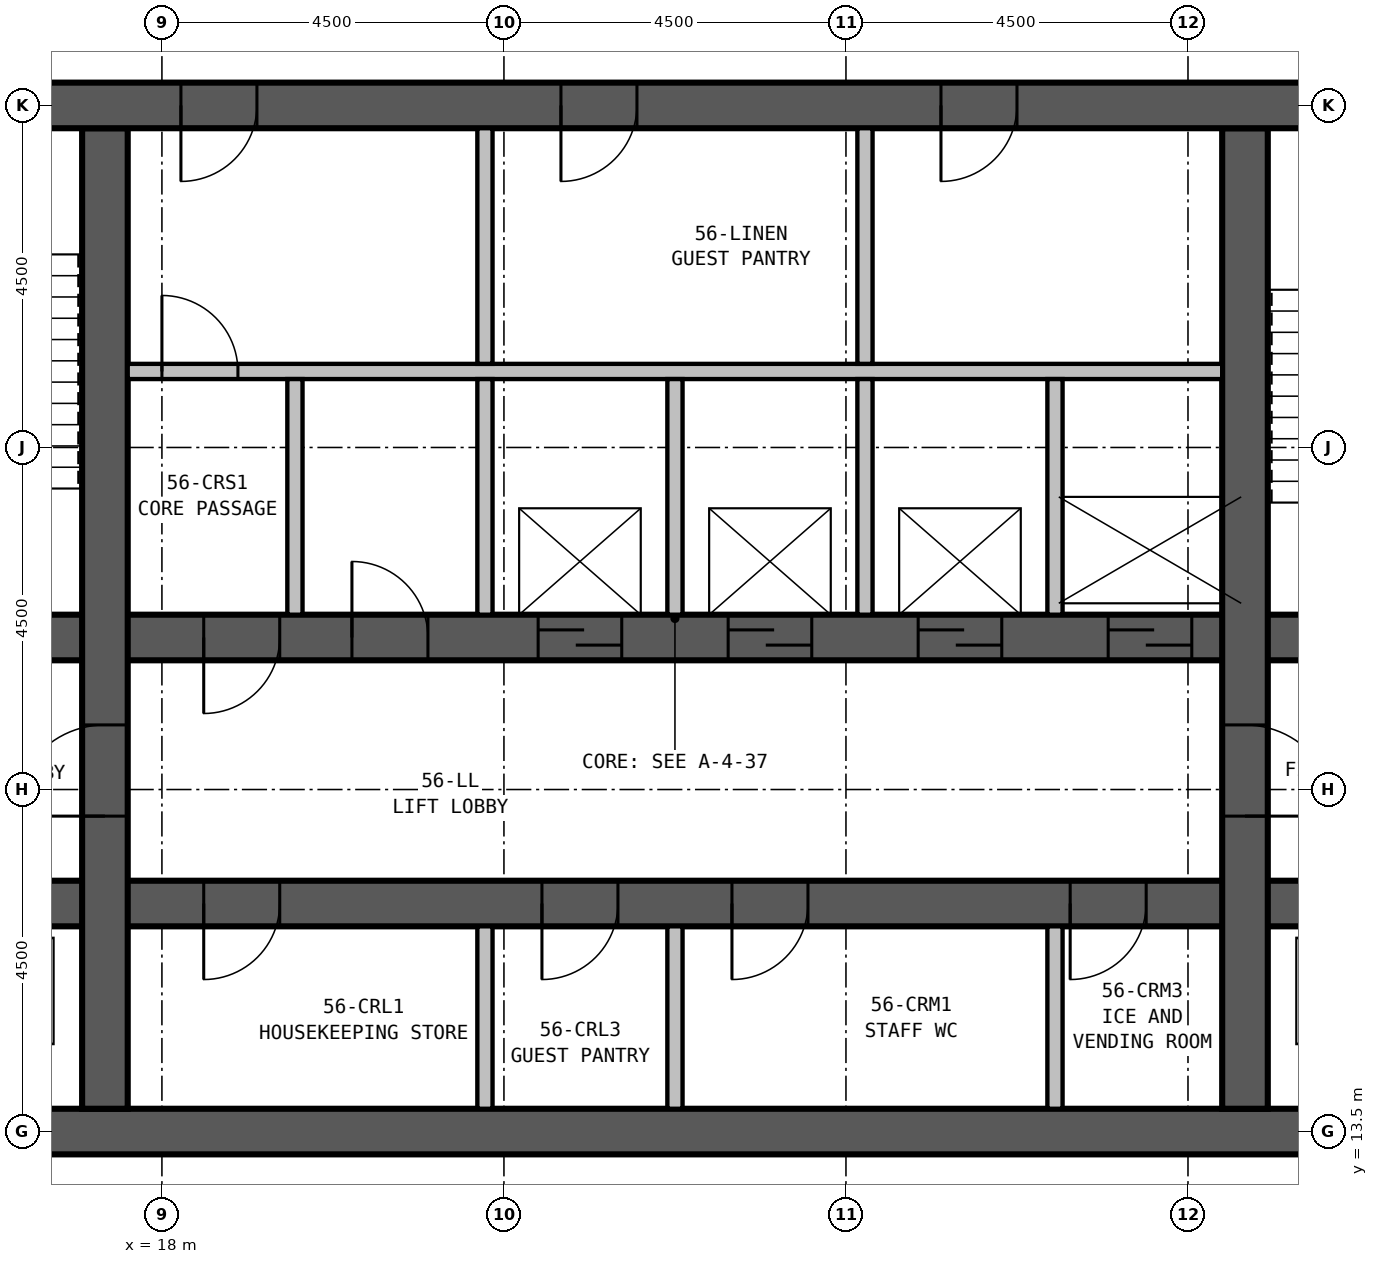
"""IFC4 building model, lengths in metres.
Left out: names, types, materials, properties, quantities, classifications, styles, units other than length and angle.
Written with IfcOpenShell. Run it as: python <this file> out.ifc"""

import sys

from ifc_helpers import new_model, si_unit, direction, frame, frame_2d, origin, place, context, subcontext, project, spatial, rectangle, extrude, element, fill, save


model = new_model("IFC4")
c1 = context("Model", 3, precision=1e-05, world=origin(), true_north=direction((0.0, 1.0)))
c2 = subcontext(c1, "Body", "Model", "MODEL_VIEW")
j1 = project(units=[si_unit("LENGTHUNIT", "METRE"), si_unit("PLANEANGLEUNIT", "RADIAN")], contexts=[c1])
p1 = place(None, origin())
s1 = spatial("IfcSite", under=j1, at=p1, CompositionType="ELEMENT")
p2 = place(p1, origin())
s2 = spatial("IfcBuilding", under=s1, at=p2, CompositionType="ELEMENT")
p3 = place(p2, frame((0.0, 0.0, 217.4)))
s3 = spatial("IfcBuildingStorey", under=s2, at=p3, CompositionType="ELEMENT", Elevation=217.4)
p4 = place(p3, frame((13.2, 13.5, 0.0), z_axis=(0.0, 0.0, 1.0), x_axis=(1.0, 0.0, 0.0)))
e1 = element("IfcWall", 1, at=p4, inside=s3, PredefinedType="SHEAR", context=c2, shape_type="SweptSolid", body=[
    extrude(rectangle(XDim=23.1, YDim=0.6, at=frame_2d((11.55, 0.0))), origin(), (0.0, 0.0, 1.0), 3.9),
])
p5 = place(p3, frame((36.3, 27.0, 0.0), z_axis=(0.0, 0.0, 1.0), x_axis=(-1.0, 0.0, 0.0)))
e2 = element("IfcWall", 2, at=p5, inside=s3, PredefinedType="SHEAR", context=c2, shape_type="SweptSolid", body=[
    extrude(rectangle(XDim=23.35, YDim=0.6, at=frame_2d((11.675, 0.0))), origin(), (0.0, 0.0, 1.0), 3.9),
])
p6 = place(p5, frame((17.05, 0.0, 0.0)))
e3 = element("IfcOpeningElement", 3, at=p6, cuts=e2, PredefinedType="OPENING", context=c2, shape_type="SweptSolid", body=[
    extrude(rectangle(XDim=1.0, YDim=2.1, at=frame_2d((0.5, 1.05))), frame((0.0, 0.31, 0.0), z_axis=(0.0, -1.0, 0.0), x_axis=(1.0, 0.0, 0.0)), (0.0, 0.0, 1.0), 0.62),
])
p7 = place(p5, frame((12.05, 0.0, 0.0)))
e4 = element("IfcOpeningElement", 4, at=p7, cuts=e2, PredefinedType="OPENING", context=c2, shape_type="SweptSolid", body=[
    extrude(rectangle(XDim=1.0, YDim=2.1, at=frame_2d((0.5, 1.05))), frame((0.0, 0.31, 0.0), z_axis=(0.0, -1.0, 0.0), x_axis=(1.0, 0.0, 0.0)), (0.0, 0.0, 1.0), 0.62),
])
p8 = place(p5, frame((7.05, 0.0, 0.0)))
e5 = element("IfcOpeningElement", 5, at=p8, cuts=e2, PredefinedType="OPENING", context=c2, shape_type="SweptSolid", body=[
    extrude(rectangle(XDim=1.0, YDim=2.1, at=frame_2d((0.5, 1.05))), frame((0.0, 0.31, 0.0), z_axis=(0.0, -1.0, 0.0), x_axis=(1.0, 0.0, 0.0)), (0.0, 0.0, 1.0), 0.62),
])
p9 = place(p3, frame((17.25, 13.8, 0.0), z_axis=(0.0, 0.0, 1.0), x_axis=(0.0, 1.0, 0.0)))
e6 = element("IfcWall", 6, at=p9, inside=s3, PredefinedType="SHEAR", context=c2, shape_type="SweptSolid", body=[
    extrude(rectangle(XDim=12.9, YDim=0.6, at=frame_2d((6.45, 0.0))), origin(), (0.0, 0.0, 1.0), 3.9),
])
p10 = place(p9, frame((3.85, 0.0, 0.0)))
e7 = element("IfcOpeningElement", 7, at=p10, cuts=e6, PredefinedType="OPENING", context=c2, shape_type="SweptSolid", body=[
    extrude(rectangle(XDim=1.2, YDim=2.1, at=frame_2d((0.6, 1.05))), frame((0.0, 0.31, 0.0), z_axis=(0.0, -1.0, 0.0), x_axis=(1.0, 0.0, 0.0)), (0.0, 0.0, 1.0), 0.62),
])
p11 = place(p3, frame((32.25, 13.8, 0.0), z_axis=(0.0, 0.0, 1.0), x_axis=(0.0, 1.0, 0.0)))
e8 = element("IfcWall", 8, at=p11, inside=s3, PredefinedType="SHEAR", context=c2, shape_type="SweptSolid", body=[
    extrude(rectangle(XDim=12.9, YDim=0.6, at=frame_2d((6.45, 0.0))), origin(), (0.0, 0.0, 1.0), 3.9),
])
p12 = place(p11, frame((5.05, 0.0, 0.0), z_axis=(0.0, 0.0, 1.0), x_axis=(-1.0, 0.0, 0.0)))
e9 = element("IfcOpeningElement", 9, at=p12, cuts=e8, PredefinedType="OPENING", context=c2, shape_type="SweptSolid", body=[
    extrude(rectangle(XDim=1.2, YDim=2.1, at=frame_2d((0.6, 1.05))), frame((0.0, 0.31, 0.0), z_axis=(0.0, -1.0, 0.0), x_axis=(1.0, 0.0, 0.0)), (0.0, 0.0, 1.0), 0.62),
])
p13 = place(p3, frame((13.8, 16.5, 0.0), z_axis=(0.0, 0.0, 1.0), x_axis=(1.0, 0.0, 0.0)))
e10 = element("IfcWall", 10, at=p13, inside=s3, PredefinedType="SHEAR", context=c2, shape_type="SweptSolid", body=[
    extrude(rectangle(XDim=21.9, YDim=0.6, at=frame_2d((10.95, 0.0))), origin(), (0.0, 0.0, 1.0), 3.9),
])
p14 = place(p13, frame((5.75, 0.0, 0.0), z_axis=(0.0, 0.0, 1.0), x_axis=(-1.0, 0.0, 0.0)))
e11 = element("IfcOpeningElement", 11, at=p14, cuts=e10, PredefinedType="OPENING", context=c2, shape_type="SweptSolid", body=[
    extrude(rectangle(XDim=1.0, YDim=2.1, at=frame_2d((0.5, 1.05))), frame((0.0, 0.31, 0.0), z_axis=(0.0, -1.0, 0.0), x_axis=(1.0, 0.0, 0.0)), (0.0, 0.0, 1.0), 0.62),
])
p15 = place(p13, frame((10.2, 0.0, 0.0), z_axis=(0.0, 0.0, 1.0), x_axis=(-1.0, 0.0, 0.0)))
e12 = element("IfcOpeningElement", 12, at=p15, cuts=e10, PredefinedType="OPENING", context=c2, shape_type="SweptSolid", body=[
    extrude(rectangle(XDim=1.0, YDim=2.1, at=frame_2d((0.5, 1.05))), frame((0.0, 0.31, 0.0), z_axis=(0.0, -1.0, 0.0), x_axis=(1.0, 0.0, 0.0)), (0.0, 0.0, 1.0), 0.62),
])
p16 = place(p13, frame((12.7, 0.0, 0.0), z_axis=(0.0, 0.0, 1.0), x_axis=(-1.0, 0.0, 0.0)))
e13 = element("IfcOpeningElement", 13, at=p16, cuts=e10, PredefinedType="OPENING", context=c2, shape_type="SweptSolid", body=[
    extrude(rectangle(XDim=1.0, YDim=2.1, at=frame_2d((0.5, 1.05))), frame((0.0, 0.31, 0.0), z_axis=(0.0, -1.0, 0.0), x_axis=(1.0, 0.0, 0.0)), (0.0, 0.0, 1.0), 0.62),
])
p17 = place(p13, frame((17.15, 0.0, 0.0), z_axis=(0.0, 0.0, 1.0), x_axis=(-1.0, 0.0, 0.0)))
e14 = element("IfcOpeningElement", 14, at=p17, cuts=e10, PredefinedType="OPENING", context=c2, shape_type="SweptSolid", body=[
    extrude(rectangle(XDim=1.0, YDim=2.1, at=frame_2d((0.5, 1.05))), frame((0.0, 0.31, 0.0), z_axis=(0.0, -1.0, 0.0), x_axis=(1.0, 0.0, 0.0)), (0.0, 0.0, 1.0), 0.62),
])
p18 = place(p13, frame((0.6, 0.0, 0.0)))
e15 = element("IfcOpeningElement", 15, at=p18, cuts=e10, PredefinedType="OPENING", context=c2, shape_type="SweptSolid", body=[
    extrude(rectangle(XDim=1.2, YDim=2.1, at=frame_2d((0.6, 1.05))), frame((0.0, 0.31, 0.0), z_axis=(0.0, -1.0, 0.0), x_axis=(1.0, 0.0, 0.0)), (0.0, 0.0, 1.0), 0.62),
])
p19 = place(p13, frame((19.6, 0.0, 0.0)))
e16 = element("IfcOpeningElement", 16, at=p19, cuts=e10, PredefinedType="OPENING", context=c2, shape_type="SweptSolid", body=[
    extrude(rectangle(XDim=1.2, YDim=2.1, at=frame_2d((0.6, 1.05))), frame((0.0, 0.31, 0.0), z_axis=(0.0, -1.0, 0.0), x_axis=(1.0, 0.0, 0.0)), (0.0, 0.0, 1.0), 0.62),
])
p20 = place(p3, frame((13.8, 20.0, 0.0), z_axis=(0.0, 0.0, 1.0), x_axis=(1.0, 0.0, 0.0)))
e17 = element("IfcWall", 17, at=p20, inside=s3, PredefinedType="SHEAR", context=c2, shape_type="SweptSolid", body=[
    extrude(rectangle(XDim=21.9, YDim=0.6, at=frame_2d((10.95, 0.0))), origin(), (0.0, 0.0, 1.0), 3.9),
])
p21 = place(p20, frame((0.5, 0.0, 0.0)))
e18 = element("IfcOpeningElement", 18, at=p21, cuts=e17, PredefinedType="OPENING", context=c2, shape_type="SweptSolid", body=[
    extrude(rectangle(XDim=1.0, YDim=2.1, at=frame_2d((0.5, 1.05))), frame((0.0, 0.31, 0.0), z_axis=(0.0, -1.0, 0.0), x_axis=(1.0, 0.0, 0.0)), (0.0, 0.0, 1.0), 0.62),
])
p22 = place(p20, frame((20.5, 0.0, 0.0)))
e19 = element("IfcOpeningElement", 19, at=p22, cuts=e17, PredefinedType="OPENING", context=c2, shape_type="SweptSolid", body=[
    extrude(rectangle(XDim=1.0, YDim=2.1, at=frame_2d((0.5, 1.05))), frame((0.0, 0.31, 0.0), z_axis=(0.0, -1.0, 0.0), x_axis=(1.0, 0.0, 0.0)), (0.0, 0.0, 1.0), 0.62),
])
p23 = place(p20, frame((9.15, 0.0, 0.0)))
e20 = element("IfcOpeningElement", 20, at=p23, cuts=e17, PredefinedType="OPENING", context=c2, shape_type="SweptSolid", body=[
    extrude(rectangle(XDim=1.1, YDim=2.1, at=frame_2d((0.55, 1.05))), frame((0.0, 0.31, 0.0), z_axis=(0.0, -1.0, 0.0), x_axis=(1.0, 0.0, 0.0)), (0.0, 0.0, 1.0), 0.62),
])
p24 = place(p20, frame((11.65, 0.0, 0.0)))
e21 = element("IfcOpeningElement", 21, at=p24, cuts=e17, PredefinedType="OPENING", context=c2, shape_type="SweptSolid", body=[
    extrude(rectangle(XDim=1.1, YDim=2.1, at=frame_2d((0.55, 1.05))), frame((0.0, 0.31, 0.0), z_axis=(0.0, -1.0, 0.0), x_axis=(1.0, 0.0, 0.0)), (0.0, 0.0, 1.0), 0.62),
])
p25 = place(p20, frame((14.15, 0.0, 0.0)))
e22 = element("IfcOpeningElement", 22, at=p25, cuts=e17, PredefinedType="OPENING", context=c2, shape_type="SweptSolid", body=[
    extrude(rectangle(XDim=1.1, YDim=2.1, at=frame_2d((0.55, 1.05))), frame((0.0, 0.31, 0.0), z_axis=(0.0, -1.0, 0.0), x_axis=(1.0, 0.0, 0.0)), (0.0, 0.0, 1.0), 0.62),
])
p26 = place(p20, frame((16.65, 0.0, 0.0)))
e23 = element("IfcOpeningElement", 23, at=p26, cuts=e17, PredefinedType="OPENING", context=c2, shape_type="SweptSolid", body=[
    extrude(rectangle(XDim=1.1, YDim=2.1, at=frame_2d((0.55, 1.05))), frame((0.0, 0.31, 0.0), z_axis=(0.0, -1.0, 0.0), x_axis=(1.0, 0.0, 0.0)), (0.0, 0.0, 1.0), 0.62),
])
p27 = place(p20, frame((5.75, 0.0, 0.0), z_axis=(0.0, 0.0, 1.0), x_axis=(-1.0, 0.0, 0.0)))
e24 = element("IfcOpeningElement", 24, at=p27, cuts=e17, PredefinedType="OPENING", context=c2, shape_type="SweptSolid", body=[
    extrude(rectangle(XDim=1.0, YDim=2.1, at=frame_2d((0.5, 1.05))), frame((0.0, 0.31, 0.0), z_axis=(0.0, -1.0, 0.0), x_axis=(1.0, 0.0, 0.0)), (0.0, 0.0, 1.0), 0.62),
])
p28 = place(p20, frame((6.7, 0.0, 0.0)))
e25 = element("IfcOpeningElement", 25, at=p28, cuts=e17, PredefinedType="OPENING", context=c2, shape_type="SweptSolid", body=[
    extrude(rectangle(XDim=1.0, YDim=2.1, at=frame_2d((0.5, 1.05))), frame((0.0, 0.31, 0.0), z_axis=(0.0, -1.0, 0.0), x_axis=(1.0, 0.0, 0.0)), (0.0, 0.0, 1.0), 0.62),
])
p29 = place(p3, frame((19.75, 20.3, 0.0), z_axis=(0.0, 0.0, 1.0), x_axis=(0.0, 1.0, 0.0)))
e26 = element("IfcWall", 26, at=p29, inside=s3, PredefinedType="PARTITIONING", context=c2, shape_type="SweptSolid", body=[
    extrude(rectangle(XDim=3.1, YDim=0.2, at=frame_2d((1.55, 0.0))), origin(), (0.0, 0.0, 1.0), 3.65),
])
p30 = place(p3, frame((22.25, 13.8, 0.0), z_axis=(0.0, 0.0, 1.0), x_axis=(0.0, 1.0, 0.0)))
e27 = element("IfcWall", 27, at=p30, inside=s3, PredefinedType="PARTITIONING", context=c2, shape_type="SweptSolid", body=[
    extrude(rectangle(XDim=2.4, YDim=0.2, at=frame_2d((1.2, 0.0))), origin(), (0.0, 0.0, 1.0), 3.65),
])
p31 = place(p3, frame((22.25, 20.3, 0.0), z_axis=(0.0, 0.0, 1.0), x_axis=(0.0, 1.0, 0.0)))
e28 = element("IfcWall", 28, at=p31, inside=s3, PredefinedType="PARTITIONING", context=c2, shape_type="SweptSolid", body=[
    extrude(rectangle(XDim=3.1, YDim=0.2, at=frame_2d((1.55, 0.0))), origin(), (0.0, 0.0, 1.0), 3.65),
])
p32 = place(p3, frame((24.75, 13.8, 0.0), z_axis=(0.0, 0.0, 1.0), x_axis=(0.0, 1.0, 0.0)))
e29 = element("IfcWall", 29, at=p32, inside=s3, PredefinedType="PARTITIONING", context=c2, shape_type="SweptSolid", body=[
    extrude(rectangle(XDim=2.4, YDim=0.2, at=frame_2d((1.2, 0.0))), origin(), (0.0, 0.0, 1.0), 3.65),
])
for number, where, z_axis, x_axis in (
    (30, (24.75, 20.3, 0.0), (0.0, 0.0, 1.0), (0.0, 1.0, 0.0)),
    (31, (27.25, 20.3, 0.0), (0.0, 0.0, 1.0), (0.0, 1.0, 0.0)),
):
    element("IfcWall", number, at=place(p3, frame(where, z_axis=z_axis, x_axis=x_axis)), inside=s3, PredefinedType="PARTITIONING", context=c2, shape_type="SweptSolid", body=[
        extrude(rectangle(XDim=3.1, YDim=0.2, at=frame_2d((1.55, 0.0))), origin(), (0.0, 0.0, 1.0), 3.65),
    ])
p33 = place(p3, frame((29.75, 13.8, 0.0), z_axis=(0.0, 0.0, 1.0), x_axis=(0.0, 1.0, 0.0)))
e32 = element("IfcWall", 32, at=p33, inside=s3, PredefinedType="PARTITIONING", context=c2, shape_type="SweptSolid", body=[
    extrude(rectangle(XDim=2.4, YDim=0.2, at=frame_2d((1.2, 0.0))), origin(), (0.0, 0.0, 1.0), 3.65),
])
p34 = place(p3, frame((29.75, 20.3, 0.0), z_axis=(0.0, 0.0, 1.0), x_axis=(0.0, 1.0, 0.0)))
e33 = element("IfcWall", 33, at=p34, inside=s3, PredefinedType="PARTITIONING", context=c2, shape_type="SweptSolid", body=[
    extrude(rectangle(XDim=3.1, YDim=0.2, at=frame_2d((1.55, 0.0))), origin(), (0.0, 0.0, 1.0), 3.65),
])
p35 = place(p3, frame((17.55, 23.5, 0.0), z_axis=(0.0, 0.0, 1.0), x_axis=(1.0, 0.0, 0.0)))
e34 = element("IfcWall", 34, at=p35, inside=s3, PredefinedType="PARTITIONING", context=c2, shape_type="SweptSolid", body=[
    extrude(rectangle(XDim=14.4, YDim=0.2, at=frame_2d((7.2, 0.0))), origin(), (0.0, 0.0, 1.0), 3.65),
])
p36 = place(p35, frame((0.45, 0.0, 0.0)))
e35 = element("IfcOpeningElement", 35, at=p36, cuts=e34, PredefinedType="OPENING", context=c2, shape_type="SweptSolid", body=[
    extrude(rectangle(XDim=1.0, YDim=2.1, at=frame_2d((0.5, 1.05))), frame((0.0, 0.11, 0.0), z_axis=(0.0, -1.0, 0.0), x_axis=(1.0, 0.0, 0.0)), (0.0, 0.0, 1.0), 0.22),
])
for number, where, z_axis, x_axis in (
    (36, (22.25, 23.6, 0.0), (0.0, 0.0, 1.0), (0.0, 1.0, 0.0)),
    (37, (27.25, 23.6, 0.0), (0.0, 0.0, 1.0), (0.0, 1.0, 0.0)),
):
    element("IfcWall", number, at=place(p3, frame(where, z_axis=z_axis, x_axis=x_axis)), inside=s3, PredefinedType="PARTITIONING", context=c2, shape_type="SweptSolid", body=[
        extrude(rectangle(XDim=3.1, YDim=0.2, at=frame_2d((1.55, 0.0))), origin(), (0.0, 0.0, 1.0), 3.65),
    ])
p37 = place(p36, origin())
e38 = element("IfcDoor", 38, at=p37, inside=s3, OperationType="SINGLE_SWING_LEFT", PredefinedType="DOOR", context=c2, shape_type="SweptSolid", body=[
    extrude(rectangle(XDim=1.0, YDim=2.1, at=frame_2d((0.5, 1.05))), frame((0.0, 0.025, 0.0), z_axis=(0.0, -1.0, 0.0), x_axis=(1.0, 0.0, 0.0)), (0.0, 0.0, 1.0), 0.05),
])
fill(e35, e38)
p38 = place(p10, origin())
e39 = element("IfcDoor", 39, at=p38, inside=s3, OperationType="SINGLE_SWING_LEFT", PredefinedType="DOOR", context=c2, shape_type="SweptSolid", body=[
    extrude(rectangle(XDim=1.2, YDim=2.1, at=frame_2d((0.6, 1.05))), frame((0.0, 0.3, 0.0), z_axis=(0.0, -1.0, 0.0), x_axis=(1.0, 0.0, 0.0)), (0.0, 0.0, 1.0), 0.6),
])
fill(e7, e39)
p39 = place(p12, origin())
e40 = element("IfcDoor", 40, at=p39, inside=s3, OperationType="SINGLE_SWING_RIGHT", PredefinedType="DOOR", context=c2, shape_type="SweptSolid", body=[
    extrude(rectangle(XDim=1.2, YDim=2.1, at=frame_2d((0.6, 1.05))), frame((0.0, 0.3, 0.0), z_axis=(0.0, -1.0, 0.0), x_axis=(1.0, 0.0, 0.0)), (0.0, 0.0, 1.0), 0.6),
])
fill(e9, e40)
p40 = place(p23, origin())
e41 = element("IfcDoor", 41, at=p40, inside=s3, OperationType="SLIDING_TO_LEFT", PredefinedType="DOOR", context=c2, shape_type="SweptSolid", body=[
    extrude(rectangle(XDim=1.1, YDim=2.1, at=frame_2d((0.55, 1.05))), frame((0.0, 0.3, 0.0), z_axis=(0.0, -1.0, 0.0), x_axis=(1.0, 0.0, 0.0)), (0.0, 0.0, 1.0), 0.6),
])
fill(e20, e41)
p41 = place(p24, origin())
e42 = element("IfcDoor", 42, at=p41, inside=s3, OperationType="SLIDING_TO_LEFT", PredefinedType="DOOR", context=c2, shape_type="SweptSolid", body=[
    extrude(rectangle(XDim=1.1, YDim=2.1, at=frame_2d((0.55, 1.05))), frame((0.0, 0.3, 0.0), z_axis=(0.0, -1.0, 0.0), x_axis=(1.0, 0.0, 0.0)), (0.0, 0.0, 1.0), 0.6),
])
fill(e21, e42)
p42 = place(p25, origin())
e43 = element("IfcDoor", 43, at=p42, inside=s3, OperationType="SLIDING_TO_LEFT", PredefinedType="DOOR", context=c2, shape_type="SweptSolid", body=[
    extrude(rectangle(XDim=1.1, YDim=2.1, at=frame_2d((0.55, 1.05))), frame((0.0, 0.3, 0.0), z_axis=(0.0, -1.0, 0.0), x_axis=(1.0, 0.0, 0.0)), (0.0, 0.0, 1.0), 0.6),
])
fill(e22, e43)
p43 = place(p26, origin())
e44 = element("IfcDoor", 44, at=p43, inside=s3, OperationType="SLIDING_TO_LEFT", PredefinedType="DOOR", context=c2, shape_type="SweptSolid", body=[
    extrude(rectangle(XDim=1.1, YDim=2.1, at=frame_2d((0.55, 1.05))), frame((0.0, 0.3, 0.0), z_axis=(0.0, -1.0, 0.0), x_axis=(1.0, 0.0, 0.0)), (0.0, 0.0, 1.0), 0.6),
])
fill(e23, e44)
p44 = place(p14, origin())
e45 = element("IfcDoor", 45, at=p44, inside=s3, OperationType="SINGLE_SWING_RIGHT", PredefinedType="DOOR", context=c2, shape_type="SweptSolid", body=[
    extrude(rectangle(XDim=1.0, YDim=2.1, at=frame_2d((0.5, 1.05))), frame((0.0, 0.3, 0.0), z_axis=(0.0, -1.0, 0.0), x_axis=(1.0, 0.0, 0.0)), (0.0, 0.0, 1.0), 0.6),
])
fill(e11, e45)
p45 = place(p15, origin())
e46 = element("IfcDoor", 46, at=p45, inside=s3, OperationType="SINGLE_SWING_RIGHT", PredefinedType="DOOR", context=c2, shape_type="SweptSolid", body=[
    extrude(rectangle(XDim=1.0, YDim=2.1, at=frame_2d((0.5, 1.05))), frame((0.0, 0.3, 0.0), z_axis=(0.0, -1.0, 0.0), x_axis=(1.0, 0.0, 0.0)), (0.0, 0.0, 1.0), 0.6),
])
fill(e12, e46)
p46 = place(p16, origin())
e47 = element("IfcDoor", 47, at=p46, inside=s3, OperationType="SINGLE_SWING_RIGHT", PredefinedType="DOOR", context=c2, shape_type="SweptSolid", body=[
    extrude(rectangle(XDim=1.0, YDim=2.1, at=frame_2d((0.5, 1.05))), frame((0.0, 0.3, 0.0), z_axis=(0.0, -1.0, 0.0), x_axis=(1.0, 0.0, 0.0)), (0.0, 0.0, 1.0), 0.6),
])
fill(e13, e47)
p47 = place(p17, origin())
e48 = element("IfcDoor", 48, at=p47, inside=s3, OperationType="SINGLE_SWING_RIGHT", PredefinedType="DOOR", context=c2, shape_type="SweptSolid", body=[
    extrude(rectangle(XDim=1.0, YDim=2.1, at=frame_2d((0.5, 1.05))), frame((0.0, 0.3, 0.0), z_axis=(0.0, -1.0, 0.0), x_axis=(1.0, 0.0, 0.0)), (0.0, 0.0, 1.0), 0.6),
])
fill(e14, e48)
p48 = place(p27, origin())
e49 = element("IfcDoor", 49, at=p48, inside=s3, OperationType="SINGLE_SWING_RIGHT", PredefinedType="DOOR", context=c2, shape_type="SweptSolid", body=[
    extrude(rectangle(XDim=1.0, YDim=2.1, at=frame_2d((0.5, 1.05))), frame((0.0, 0.3, 0.0), z_axis=(0.0, -1.0, 0.0), x_axis=(1.0, 0.0, 0.0)), (0.0, 0.0, 1.0), 0.6),
])
fill(e24, e49)
p49 = place(p28, origin())
e50 = element("IfcDoor", 50, at=p49, inside=s3, OperationType="SINGLE_SWING_LEFT", PredefinedType="DOOR", context=c2, shape_type="SweptSolid", body=[
    extrude(rectangle(XDim=1.0, YDim=2.1, at=frame_2d((0.5, 1.05))), frame((0.0, 0.3, 0.0), z_axis=(0.0, -1.0, 0.0), x_axis=(1.0, 0.0, 0.0)), (0.0, 0.0, 1.0), 0.6),
])
fill(e25, e50)
p50 = place(p6, origin())
e51 = element("IfcDoor", 51, at=p50, inside=s3, OperationType="SINGLE_SWING_RIGHT", PredefinedType="DOOR", context=c2, shape_type="SweptSolid", body=[
    extrude(rectangle(XDim=1.0, YDim=2.1, at=frame_2d((0.5, 1.05))), frame((0.0, 0.3, 0.0), z_axis=(0.0, -1.0, 0.0), x_axis=(1.0, 0.0, 0.0)), (0.0, 0.0, 1.0), 0.6),
])
fill(e3, e51)
p51 = place(p7, origin())
e52 = element("IfcDoor", 52, at=p51, inside=s3, OperationType="SINGLE_SWING_RIGHT", PredefinedType="DOOR", context=c2, shape_type="SweptSolid", body=[
    extrude(rectangle(XDim=1.0, YDim=2.1, at=frame_2d((0.5, 1.05))), frame((0.0, 0.3, 0.0), z_axis=(0.0, -1.0, 0.0), x_axis=(1.0, 0.0, 0.0)), (0.0, 0.0, 1.0), 0.6),
])
fill(e4, e52)
p52 = place(p8, origin())
e53 = element("IfcDoor", 53, at=p52, inside=s3, OperationType="SINGLE_SWING_RIGHT", PredefinedType="DOOR", context=c2, shape_type="SweptSolid", body=[
    extrude(rectangle(XDim=1.0, YDim=2.1, at=frame_2d((0.5, 1.05))), frame((0.0, 0.3, 0.0), z_axis=(0.0, -1.0, 0.0), x_axis=(1.0, 0.0, 0.0)), (0.0, 0.0, 1.0), 0.6),
])
fill(e5, e53)
save(model, sys.argv[1])
